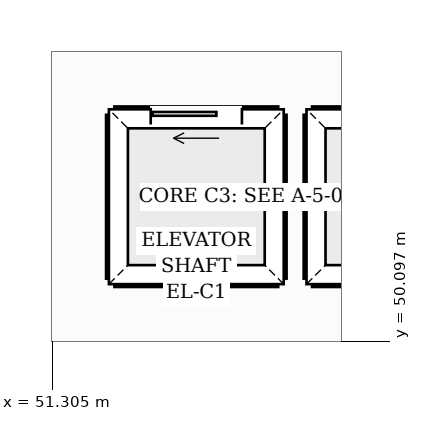
"""IFC4 building model, lengths in metres.
Left out: names, types, materials, properties, quantities, classifications, styles, units other than length and angle.
Written with IfcOpenShell. Run it as: python <this file> out.ifc"""

import sys

from ifc_helpers import new_model, si_unit, direction, frame, frame_2d, origin, place, context, subcontext, project, spatial, rectangle, extrude, element, fill, save


model = new_model("IFC4")
c1 = context("Model", 3, precision=1e-05, world=origin(), true_north=direction((0.0, 1.0)))
c2 = subcontext(c1, "Body", "Model", "MODEL_VIEW")
j1 = project(units=[si_unit("LENGTHUNIT", "METRE"), si_unit("PLANEANGLEUNIT", "RADIAN")], contexts=[c1])
p1 = place(None, origin())
s1 = spatial("IfcSite", under=j1, at=p1, CompositionType="ELEMENT")
p2 = place(p1, origin())
s2 = spatial("IfcBuilding", under=s1, at=p2, CompositionType="ELEMENT")
p3 = place(p2, frame((0.0, 0.0, 15.0)))
s3 = spatial("IfcBuildingStorey", under=s2, at=p3, CompositionType="ELEMENT", Elevation=15.0)
p4 = place(p3, frame((52.14, 53.06, 0.0), z_axis=(0.0, 0.0, 1.0), x_axis=(1.0, 0.0, 0.0)))
e1 = element("IfcWall", 1, at=p4, inside=s3, PredefinedType="SHEAR", context=c2, shape_type="SweptSolid", body=[
    extrude(rectangle(XDim=2.12, YDim=0.22, at=frame_2d((1.06, 0.0))), origin(), (0.0, 0.0, 1.0), 4.56),
])
p5 = place(p4, frame((0.46, 0.0, 0.0)))
e2 = element("IfcOpeningElement", 2, at=p5, cuts=e1, PredefinedType="OPENING", context=c2, shape_type="SweptSolid", body=[
    extrude(rectangle(XDim=1.2, YDim=2.25, at=frame_2d((0.6, 1.125))), frame((0.0, 0.12, 0.0), z_axis=(0.0, -1.0, 0.0), x_axis=(1.0, 0.0, 0.0)), (0.0, 0.0, 1.0), 0.24),
])
for number, where, z_axis, x_axis in (
    (3, (52.14, 50.94, 0.0), (0.0, 0.0, 1.0), (1.0, 0.0, 0.0)),
    (4, (54.26, 50.94, 0.0), (0.0, 0.0, 1.0), (0.0, 1.0, 0.0)),
    (5, (52.14, 50.94, 0.0), (0.0, 0.0, 1.0), (0.0, 1.0, 0.0)),
):
    element("IfcWall", number, at=place(p3, frame(where, z_axis=z_axis, x_axis=x_axis)), inside=s3, PredefinedType="SHEAR", context=c2, shape_type="SweptSolid", body=[
        extrude(rectangle(XDim=2.12, YDim=0.22, at=frame_2d((1.06, 0.0))), origin(), (0.0, 0.0, 1.0), 4.56),
    ])
p6 = place(p3, frame((54.74, 53.06, 0.0), z_axis=(0.0, 0.0, 1.0), x_axis=(1.0, 0.0, 0.0)))
e6 = element("IfcWall", 6, at=p6, inside=s3, PredefinedType="SHEAR", context=c2, shape_type="SweptSolid", body=[
    extrude(rectangle(XDim=2.12, YDim=0.22, at=frame_2d((1.06, 0.0))), origin(), (0.0, 0.0, 1.0), 4.56),
])
p7 = place(p6, frame((0.46, 0.0, 0.0)))
e7 = element("IfcOpeningElement", 7, at=p7, cuts=e6, PredefinedType="OPENING", context=c2, shape_type="SweptSolid", body=[
    extrude(rectangle(XDim=1.2, YDim=2.25, at=frame_2d((0.6, 1.125))), frame((0.0, 0.12, 0.0), z_axis=(0.0, -1.0, 0.0), x_axis=(1.0, 0.0, 0.0)), (0.0, 0.0, 1.0), 0.24),
])
for number, where, z_axis, x_axis in (
    (8, (54.74, 50.94, 0.0), (0.0, 0.0, 1.0), (1.0, 0.0, 0.0)),
    (9, (54.74, 50.94, 0.0), (0.0, 0.0, 1.0), (0.0, 1.0, 0.0)),
):
    element("IfcWall", number, at=place(p3, frame(where, z_axis=z_axis, x_axis=x_axis)), inside=s3, PredefinedType="SHEAR", context=c2, shape_type="SweptSolid", body=[
        extrude(rectangle(XDim=2.12, YDim=0.22, at=frame_2d((1.06, 0.0))), origin(), (0.0, 0.0, 1.0), 4.56),
    ])
p8 = place(p5, origin())
e10 = element("IfcDoor", 10, at=p8, inside=s3, OperationType="SLIDING_TO_LEFT", PredefinedType="DOOR", context=c2, shape_type="SweptSolid", body=[
    extrude(rectangle(XDim=1.2, YDim=2.25, at=frame_2d((0.6, 1.125))), frame((0.0, 0.025, 0.0), z_axis=(0.0, -1.0, 0.0), x_axis=(1.0, 0.0, 0.0)), (0.0, 0.0, 1.0), 0.05),
])
fill(e2, e10)
save(model, sys.argv[1])
